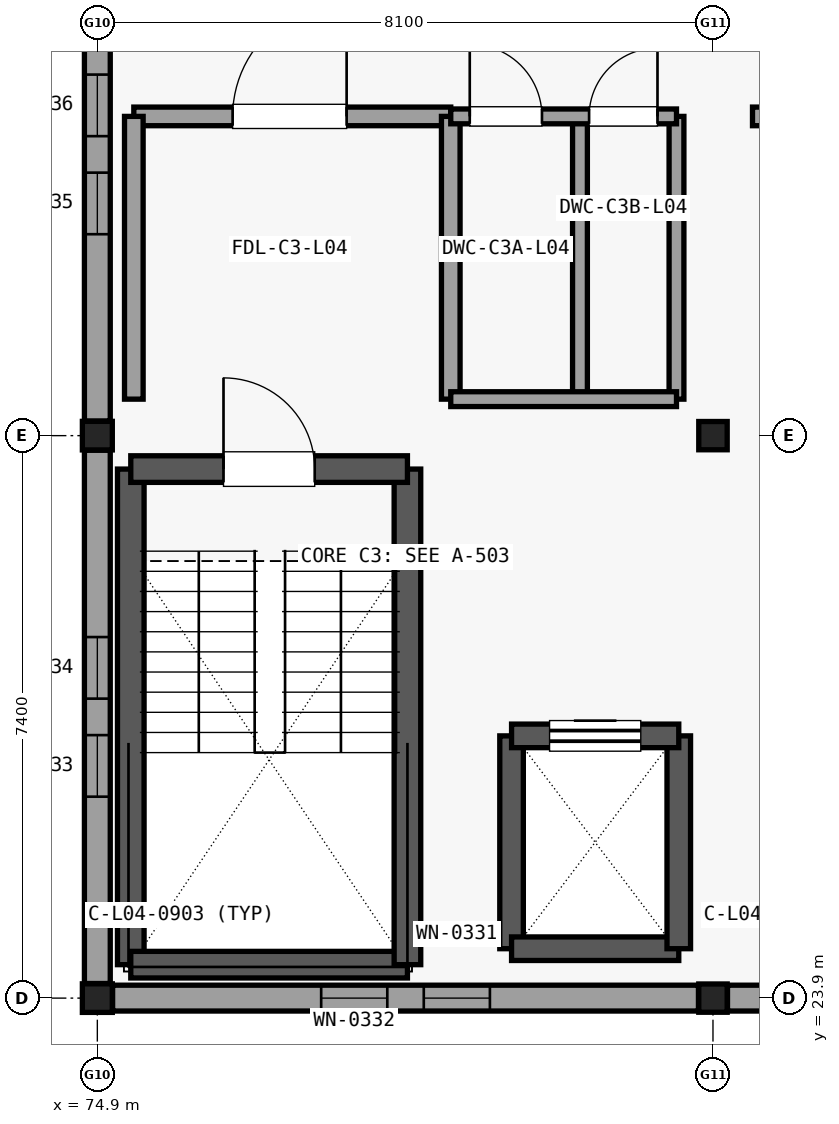
"""IFC4 building model, lengths in metres.
Left out: names, types, materials, properties, quantities, classifications, styles, units other than length and angle.
Written with IfcOpenShell. Run it as: python <this file> out.ifc"""

import sys

from ifc_helpers import new_model, si_unit, direction, frame, frame_2d, origin, origin_2d, place, context, subcontext, project, spatial, rectangle, i_section, extrude, element, fill, save


model = new_model("IFC4")
c1 = context("Model", 3, precision=1e-05, world=origin(), true_north=direction((0.0, 1.0)))
c2 = subcontext(c1, "Body", "Model", "MODEL_VIEW")
j1 = project(units=[si_unit("LENGTHUNIT", "METRE"), si_unit("PLANEANGLEUNIT", "RADIAN")], contexts=[c1])
p1 = place(None, origin())
s1 = spatial("IfcSite", under=j1, at=p1, CompositionType="ELEMENT")
p2 = place(p1, origin())
s2 = spatial("IfcBuilding", under=s1, at=p2, CompositionType="ELEMENT")
p3 = place(p2, frame((0.0, 0.0, 17.4)))
s3 = spatial("IfcBuildingStorey", under=s2, at=p3, CompositionType="ELEMENT", Elevation=17.4)
for number, where, z_axis, x_axis in (
    (1, (74.9, 23.9, 0.0), (0.0, 0.0, 1.0), (1.0, 0.0, 0.0)),
    (2, (74.9, 31.3, 0.0), (0.0, 0.0, 1.0), (1.0, 0.0, 0.0)),
):
    element("IfcColumn", number, at=place(p3, frame(where, z_axis=z_axis, x_axis=x_axis)), inside=s3, PredefinedType="COLUMN", context=c2, shape_type="SweptSolid", body=[
        extrude(i_section(OverallWidth=0.394, OverallDepth=0.376, WebThickness=0.017, FlangeThickness=0.028, at=origin_2d()), origin(), (0.0, 0.0, 1.0), 3.38),
    ])
for number, where, z_axis, x_axis in (
    (3, (83.0, 23.9, 0.0), (0.0, 0.0, 1.0), (1.0, 0.0, 0.0)),
    (4, (83.0, 31.3, 0.0), (0.0, 0.0, 1.0), (1.0, 0.0, 0.0)),
):
    element("IfcColumn", number, at=place(p3, frame(where, z_axis=z_axis, x_axis=x_axis)), inside=s3, PredefinedType="COLUMN", context=c2, shape_type="SweptSolid", body=[
        extrude(i_section(OverallWidth=0.374, OverallDepth=0.372, WebThickness=0.016, FlangeThickness=0.026, at=origin_2d()), origin(), (0.0, 0.0, 1.0), 3.38),
    ])
p4 = place(p3, frame((82.809, 23.9, 0.0), z_axis=(0.0, 0.0, 1.0), x_axis=(-1.0, 0.0, 0.0)))
e5 = element("IfcWall", 5, at=p4, inside=s3, PredefinedType="SOLIDWALL", context=c2, shape_type="SweptSolid", body=[
    extrude(rectangle(XDim=7.708, YDim=0.34, at=frame_2d((3.854, 0.0))), origin(), (0.0, 0.0, 1.0), 2.908),
])
p5 = place(p4, frame((2.744, 0.0, 0.6)))
e6 = element("IfcOpeningElement", 6, at=p5, cuts=e5, PredefinedType="OPENING", context=c2, shape_type="SweptSolid", body=[
    extrude(rectangle(XDim=0.87, YDim=1.82, at=frame_2d((0.435, 0.91))), frame((0.0, 0.18, 0.0), z_axis=(0.0, -1.0, 0.0), x_axis=(1.0, 0.0, 0.0)), (0.0, 0.0, 1.0), 0.36),
])
p6 = place(p4, frame((4.094, 0.0, 0.6)))
e7 = element("IfcOpeningElement", 7, at=p6, cuts=e5, PredefinedType="OPENING", context=c2, shape_type="SweptSolid", body=[
    extrude(rectangle(XDim=0.87, YDim=1.82, at=frame_2d((0.435, 0.91))), frame((0.0, 0.18, 0.0), z_axis=(0.0, -1.0, 0.0), x_axis=(1.0, 0.0, 0.0)), (0.0, 0.0, 1.0), 0.36),
])
p7 = place(p3, frame((74.9, 24.092, 0.0), z_axis=(0.0, 0.0, 1.0), x_axis=(0.0, 1.0, 0.0)))
e8 = element("IfcWall", 8, at=p7, inside=s3, PredefinedType="SOLIDWALL", context=c2, shape_type="SweptSolid", body=[
    extrude(rectangle(XDim=7.016, YDim=0.34, at=frame_2d((3.508, 0.0))), origin(), (0.0, 0.0, 1.0), 2.908),
])
p8 = place(p7, frame((2.458, 0.0, 0.6)))
e9 = element("IfcOpeningElement", 9, at=p8, cuts=e8, PredefinedType="OPENING", context=c2, shape_type="SweptSolid", body=[
    extrude(rectangle(XDim=0.81, YDim=1.84, at=frame_2d((0.405, 0.92))), frame((0.0, 0.18, 0.0), z_axis=(0.0, -1.0, 0.0), x_axis=(1.0, 0.0, 0.0)), (0.0, 0.0, 1.0), 0.36),
])
p9 = place(p7, frame((3.748, 0.0, 0.6)))
e10 = element("IfcOpeningElement", 10, at=p9, cuts=e8, PredefinedType="OPENING", context=c2, shape_type="SweptSolid", body=[
    extrude(rectangle(XDim=0.81, YDim=1.84, at=frame_2d((0.405, 0.92))), frame((0.0, 0.18, 0.0), z_axis=(0.0, -1.0, 0.0), x_axis=(1.0, 0.0, 0.0)), (0.0, 0.0, 1.0), 0.36),
])
p10 = place(p3, frame((74.9, 31.492, 0.0), z_axis=(0.0, 0.0, 1.0), x_axis=(0.0, 1.0, 0.0)))
e11 = element("IfcWall", 11, at=p10, inside=s3, PredefinedType="SOLIDWALL", context=c2, shape_type="SweptSolid", body=[
    extrude(rectangle(XDim=7.016, YDim=0.34, at=frame_2d((3.508, 0.0))), origin(), (0.0, 0.0, 1.0), 2.681),
])
p11 = place(p10, frame((2.458, 0.0, 0.6)))
e12 = element("IfcOpeningElement", 12, at=p11, cuts=e11, PredefinedType="OPENING", context=c2, shape_type="SweptSolid", body=[
    extrude(rectangle(XDim=0.81, YDim=1.84, at=frame_2d((0.405, 0.92))), frame((0.0, 0.18, 0.0), z_axis=(0.0, -1.0, 0.0), x_axis=(1.0, 0.0, 0.0)), (0.0, 0.0, 1.0), 0.36),
])
p12 = place(p10, frame((3.748, 0.0, 0.6)))
e13 = element("IfcOpeningElement", 13, at=p12, cuts=e11, PredefinedType="OPENING", context=c2, shape_type="SweptSolid", body=[
    extrude(rectangle(XDim=0.81, YDim=1.84, at=frame_2d((0.405, 0.92))), frame((0.0, 0.18, 0.0), z_axis=(0.0, -1.0, 0.0), x_axis=(1.0, 0.0, 0.0)), (0.0, 0.0, 1.0), 0.36),
])
p13 = place(p3, frame((90.909, 23.9, 0.0), z_axis=(0.0, 0.0, 1.0), x_axis=(-1.0, 0.0, 0.0)))
e14 = element("IfcWall", 14, at=p13, inside=s3, PredefinedType="SOLIDWALL", context=c2, shape_type="SweptSolid", body=[
    extrude(rectangle(XDim=7.718, YDim=0.34, at=frame_2d((3.859, 0.0))), origin(), (0.0, 0.0, 1.0), 2.908),
])
p14 = place(p13, frame((2.749, 0.0, 0.6)))
e15 = element("IfcOpeningElement", 15, at=p14, cuts=e14, PredefinedType="OPENING", context=c2, shape_type="SweptSolid", body=[
    extrude(rectangle(XDim=0.87, YDim=1.82, at=frame_2d((0.435, 0.91))), frame((0.0, 0.18, 0.0), z_axis=(0.0, -1.0, 0.0), x_axis=(1.0, 0.0, 0.0)), (0.0, 0.0, 1.0), 0.36),
])
p15 = place(p13, frame((4.099, 0.0, 0.6)))
e16 = element("IfcOpeningElement", 16, at=p15, cuts=e14, PredefinedType="OPENING", context=c2, shape_type="SweptSolid", body=[
    extrude(rectangle(XDim=0.87, YDim=1.82, at=frame_2d((0.435, 0.91))), frame((0.0, 0.18, 0.0), z_axis=(0.0, -1.0, 0.0), x_axis=(1.0, 0.0, 0.0)), (0.0, 0.0, 1.0), 0.36),
])
p16 = place(p3, frame((75.34, 24.34, 0.0), z_axis=(0.0, 0.0, 1.0), x_axis=(0.0, 1.0, 0.0)))
e17 = element("IfcWall", 17, at=p16, inside=s3, PredefinedType="SHEAR", context=c2, shape_type="SweptSolid", body=[
    extrude(rectangle(XDim=6.52, YDim=0.35, at=frame_2d((3.26, 0.0))), origin(), (0.0, 0.0, 1.0), 3.375),
])
p17 = place(p3, frame((75.34, 24.34, 0.0), z_axis=(0.0, 0.0, 1.0), x_axis=(1.0, 0.0, 0.0)))
e18 = element("IfcWall", 18, at=p17, inside=s3, PredefinedType="SHEAR", context=c2, shape_type="SweptSolid", body=[
    extrude(rectangle(XDim=3.64, YDim=0.35, at=frame_2d((1.82, 0.0))), origin(), (0.0, 0.0, 1.0), 3.375),
])
p18 = place(p3, frame((78.98, 24.34, 0.0), z_axis=(0.0, 0.0, 1.0), x_axis=(0.0, 1.0, 0.0)))
e19 = element("IfcWall", 19, at=p18, inside=s3, PredefinedType="SHEAR", context=c2, shape_type="SweptSolid", body=[
    extrude(rectangle(XDim=6.52, YDim=0.35, at=frame_2d((3.26, 0.0))), origin(), (0.0, 0.0, 1.0), 3.375),
])
p19 = place(p3, frame((75.34, 30.86, 0.0), z_axis=(0.0, 0.0, 1.0), x_axis=(1.0, 0.0, 0.0)))
e20 = element("IfcWall", 20, at=p19, inside=s3, PredefinedType="SHEAR", context=c2, shape_type="SweptSolid", body=[
    extrude(rectangle(XDim=3.64, YDim=0.35, at=frame_2d((1.82, 0.0))), origin(), (0.0, 0.0, 1.0), 3.375),
])
p20 = place(p19, frame((1.22, 0.0, 0.0)))
e21 = element("IfcOpeningElement", 21, at=p20, cuts=e20, PredefinedType="OPENING", context=c2, shape_type="SweptSolid", body=[
    extrude(rectangle(XDim=1.2, YDim=2.15, at=frame_2d((0.6, 1.075))), frame((0.0, 0.185, 0.0), z_axis=(0.0, -1.0, 0.0), x_axis=(1.0, 0.0, 0.0)), (0.0, 0.0, 1.0), 0.37),
])
p21 = place(p3, frame((80.35, 24.55, 0.0), z_axis=(0.0, 0.0, 1.0), x_axis=(0.0, 1.0, 0.0)))
e22 = element("IfcWall", 22, at=p21, inside=s3, PredefinedType="SHEAR", context=c2, shape_type="SweptSolid", body=[
    extrude(rectangle(XDim=2.8, YDim=0.31, at=frame_2d((1.4, 0.0))), origin(), (0.0, 0.0, 1.0), 3.375),
])
p22 = place(p3, frame((80.35, 24.55, 0.0), z_axis=(0.0, 0.0, 1.0), x_axis=(1.0, 0.0, 0.0)))
e23 = element("IfcWall", 23, at=p22, inside=s3, PredefinedType="SHEAR", context=c2, shape_type="SweptSolid", body=[
    extrude(rectangle(XDim=2.2, YDim=0.31, at=frame_2d((1.1, 0.0))), origin(), (0.0, 0.0, 1.0), 3.375),
])
p23 = place(p3, frame((82.55, 24.55, 0.0), z_axis=(0.0, 0.0, 1.0), x_axis=(0.0, 1.0, 0.0)))
e24 = element("IfcWall", 24, at=p23, inside=s3, PredefinedType="SHEAR", context=c2, shape_type="SweptSolid", body=[
    extrude(rectangle(XDim=2.8, YDim=0.31, at=frame_2d((1.4, 0.0))), origin(), (0.0, 0.0, 1.0), 3.375),
])
p24 = place(p3, frame((80.35, 27.35, 0.0), z_axis=(0.0, 0.0, 1.0), x_axis=(1.0, 0.0, 0.0)))
e25 = element("IfcWall", 25, at=p24, inside=s3, PredefinedType="SHEAR", context=c2, shape_type="SweptSolid", body=[
    extrude(rectangle(XDim=2.2, YDim=0.31, at=frame_2d((1.1, 0.0))), origin(), (0.0, 0.0, 1.0), 3.375),
])
p25 = place(p24, frame((0.5, 0.0, 0.0)))
e26 = element("IfcOpeningElement", 26, at=p25, cuts=e25, PredefinedType="OPENING", context=c2, shape_type="SweptSolid", body=[
    extrude(rectangle(XDim=1.2, YDim=2.15, at=frame_2d((0.6, 1.075))), frame((0.0, 0.165, 0.0), z_axis=(0.0, -1.0, 0.0), x_axis=(1.0, 0.0, 0.0)), (0.0, 0.0, 1.0), 0.33),
])
p26 = place(p3, frame((75.38, 35.5, 0.0), z_axis=(0.0, 0.0, 1.0), x_axis=(1.0, 0.0, 0.0)))
e27 = element("IfcWall", 27, at=p26, inside=s3, PredefinedType="PARTITIONING", context=c2, shape_type="SweptSolid", body=[
    extrude(rectangle(XDim=4.17, YDim=0.245, at=frame_2d((2.085, 0.0))), origin(), (0.0, 0.0, 1.0), 2.913),
])
p27 = place(p26, frame((1.3, 0.0, 0.0)))
e28 = element("IfcOpeningElement", 28, at=p27, cuts=e27, PredefinedType="OPENING", context=c2, shape_type="SweptSolid", body=[
    extrude(rectangle(XDim=1.5, YDim=2.15, at=frame_2d((0.75, 1.075))), frame((0.0, 0.133, 0.0), z_axis=(0.0, -1.0, 0.0), x_axis=(1.0, 0.0, 0.0)), (0.0, 0.0, 1.0), 0.265),
])
for number, where, z_axis, x_axis in (
    (29, (75.38, 31.78, 0.0), (0.0, 0.0, 1.0), (0.0, 1.0, 0.0)),
    (30, (79.55, 31.78, 0.0), (0.0, 0.0, 1.0), (0.0, 1.0, 0.0)),
):
    element("IfcWall", number, at=place(p3, frame(where, z_axis=z_axis, x_axis=x_axis)), inside=s3, PredefinedType="PARTITIONING", context=c2, shape_type="SweptSolid", body=[
        extrude(rectangle(XDim=3.72, YDim=0.245, at=frame_2d((1.86, 0.0))), origin(), (0.0, 0.0, 1.0), 2.913),
    ])
for number, where, z_axis, x_axis in (
    (31, (81.25, 31.78, 0.0), (0.0, 0.0, 1.0), (0.0, 1.0, 0.0)),
    (32, (82.52, 31.78, 0.0), (0.0, 0.0, 1.0), (0.0, 1.0, 0.0)),
):
    element("IfcWall", number, at=place(p3, frame(where, z_axis=z_axis, x_axis=x_axis)), inside=s3, PredefinedType="PARTITIONING", context=c2, shape_type="SweptSolid", body=[
        extrude(rectangle(XDim=3.72, YDim=0.195, at=frame_2d((1.86, 0.0))), origin(), (0.0, 0.0, 1.0), 2.913),
    ])
p28 = place(p3, frame((79.55, 31.78, 0.0), z_axis=(0.0, 0.0, 1.0), x_axis=(1.0, 0.0, 0.0)))
e33 = element("IfcWall", 33, at=p28, inside=s3, PredefinedType="PARTITIONING", context=c2, shape_type="SweptSolid", body=[
    extrude(rectangle(XDim=2.97, YDim=0.195, at=frame_2d((1.485, 0.0))), origin(), (0.0, 0.0, 1.0), 2.913),
])
p29 = place(p3, frame((79.55, 35.5, 0.0), z_axis=(0.0, 0.0, 1.0), x_axis=(1.0, 0.0, 0.0)))
e34 = element("IfcWall", 34, at=p29, inside=s3, PredefinedType="PARTITIONING", context=c2, shape_type="SweptSolid", body=[
    extrude(rectangle(XDim=2.97, YDim=0.195, at=frame_2d((1.485, 0.0))), origin(), (0.0, 0.0, 1.0), 3.365),
])
p30 = place(p29, frame((0.25, 0.0, 0.0)))
e35 = element("IfcOpeningElement", 35, at=p30, cuts=e34, PredefinedType="OPENING", context=c2, shape_type="SweptSolid", body=[
    extrude(rectangle(XDim=0.95, YDim=2.1, at=frame_2d((0.475, 1.05))), frame((0.0, 0.107, 0.0), z_axis=(0.0, -1.0, 0.0), x_axis=(1.0, 0.0, 0.0)), (0.0, 0.0, 1.0), 0.215),
])
p31 = place(p29, frame((1.82, 0.0, 0.0)))
e36 = element("IfcOpeningElement", 36, at=p31, cuts=e34, PredefinedType="OPENING", context=c2, shape_type="SweptSolid", body=[
    extrude(rectangle(XDim=0.9, YDim=2.1, at=frame_2d((0.45, 1.05))), frame((0.0, 0.107, 0.0), z_axis=(0.0, -1.0, 0.0), x_axis=(1.0, 0.0, 0.0)), (0.0, 0.0, 1.0), 0.215),
])
p32 = place(p3, frame((83.52, 35.5, 0.0), z_axis=(0.0, 0.0, 1.0), x_axis=(1.0, 0.0, 0.0)))
e37 = element("IfcWall", 37, at=p32, inside=s3, PredefinedType="PARTITIONING", context=c2, shape_type="SweptSolid", body=[
    extrude(rectangle(XDim=7.06, YDim=0.245, at=frame_2d((3.53, 0.0))), origin(), (0.0, 0.0, 1.0), 3.365),
])
p33 = place(p32, frame((2.43, 0.0, 0.0)))
e38 = element("IfcOpeningElement", 38, at=p33, cuts=e37, PredefinedType="OPENING", context=c2, shape_type="SweptSolid", body=[
    extrude(rectangle(XDim=2.2, YDim=2.65, at=frame_2d((1.1, 1.325))), frame((0.0, 0.133, 0.0), z_axis=(0.0, -1.0, 0.0), x_axis=(1.0, 0.0, 0.0)), (0.0, 0.0, 1.0), 0.265),
])
p34 = place(p5, origin())
e39 = element("IfcWindow", 39, at=p34, inside=s3, PartitioningType="SINGLE_PANEL", PredefinedType="WINDOW", context=c2, shape_type="SweptSolid", body=[
    extrude(rectangle(XDim=0.87, YDim=1.82, at=frame_2d((0.435, 0.91))), frame((0.0, 0.03, 0.0), z_axis=(0.0, -1.0, 0.0), x_axis=(1.0, 0.0, 0.0)), (0.0, 0.0, 1.0), 0.06),
])
fill(e6, e39)
p35 = place(p6, origin())
e40 = element("IfcWindow", 40, at=p35, inside=s3, PartitioningType="SINGLE_PANEL", PredefinedType="WINDOW", context=c2, shape_type="SweptSolid", body=[
    extrude(rectangle(XDim=0.87, YDim=1.82, at=frame_2d((0.435, 0.91))), frame((0.0, 0.03, 0.0), z_axis=(0.0, -1.0, 0.0), x_axis=(1.0, 0.0, 0.0)), (0.0, 0.0, 1.0), 0.06),
])
fill(e7, e40)
p36 = place(p8, origin())
e41 = element("IfcWindow", 41, at=p36, inside=s3, PartitioningType="SINGLE_PANEL", PredefinedType="WINDOW", context=c2, shape_type="SweptSolid", body=[
    extrude(rectangle(XDim=0.81, YDim=1.84, at=frame_2d((0.405, 0.92))), frame((0.0, 0.03, 0.0), z_axis=(0.0, -1.0, 0.0), x_axis=(1.0, 0.0, 0.0)), (0.0, 0.0, 1.0), 0.06),
])
fill(e9, e41)
p37 = place(p9, origin())
e42 = element("IfcWindow", 42, at=p37, inside=s3, PartitioningType="SINGLE_PANEL", PredefinedType="WINDOW", context=c2, shape_type="SweptSolid", body=[
    extrude(rectangle(XDim=0.81, YDim=1.84, at=frame_2d((0.405, 0.92))), frame((0.0, 0.03, 0.0), z_axis=(0.0, -1.0, 0.0), x_axis=(1.0, 0.0, 0.0)), (0.0, 0.0, 1.0), 0.06),
])
fill(e10, e42)
p38 = place(p11, origin())
e43 = element("IfcWindow", 43, at=p38, inside=s3, PartitioningType="SINGLE_PANEL", PredefinedType="WINDOW", context=c2, shape_type="SweptSolid", body=[
    extrude(rectangle(XDim=0.81, YDim=1.84, at=frame_2d((0.405, 0.92))), frame((0.0, 0.03, 0.0), z_axis=(0.0, -1.0, 0.0), x_axis=(1.0, 0.0, 0.0)), (0.0, 0.0, 1.0), 0.06),
])
fill(e12, e43)
p39 = place(p12, origin())
e44 = element("IfcWindow", 44, at=p39, inside=s3, PartitioningType="SINGLE_PANEL", PredefinedType="WINDOW", context=c2, shape_type="SweptSolid", body=[
    extrude(rectangle(XDim=0.81, YDim=1.84, at=frame_2d((0.405, 0.92))), frame((0.0, 0.03, 0.0), z_axis=(0.0, -1.0, 0.0), x_axis=(1.0, 0.0, 0.0)), (0.0, 0.0, 1.0), 0.06),
])
fill(e13, e44)
p40 = place(p20, origin())
e45 = element("IfcDoor", 45, at=p40, inside=s3, OperationType="SINGLE_SWING_LEFT", PredefinedType="DOOR", context=c2, shape_type="SweptSolid", body=[
    extrude(rectangle(XDim=1.2, YDim=2.15, at=frame_2d((0.6, 1.075))), frame((0.0, 0.025, 0.0), z_axis=(0.0, -1.0, 0.0), x_axis=(1.0, 0.0, 0.0)), (0.0, 0.0, 1.0), 0.05),
])
fill(e21, e45)
p41 = place(p25, origin())
e46 = element("IfcDoor", 46, at=p41, inside=s3, OperationType="SLIDING_TO_RIGHT", PredefinedType="DOOR", context=c2, shape_type="SweptSolid", body=[
    extrude(rectangle(XDim=1.2, YDim=2.15, at=frame_2d((0.6, 1.075))), frame((0.0, 0.025, 0.0), z_axis=(0.0, -1.0, 0.0), x_axis=(1.0, 0.0, 0.0)), (0.0, 0.0, 1.0), 0.05),
])
fill(e26, e46)
p42 = place(p27, origin())
e47 = element("IfcDoor", 47, at=p42, inside=s3, OperationType="SINGLE_SWING_RIGHT", PredefinedType="DOOR", context=c2, shape_type="SweptSolid", body=[
    extrude(rectangle(XDim=1.5, YDim=2.15, at=frame_2d((0.75, 1.075))), frame((0.0, 0.025, 0.0), z_axis=(0.0, -1.0, 0.0), x_axis=(1.0, 0.0, 0.0)), (0.0, 0.0, 1.0), 0.05),
])
fill(e28, e47)
p43 = place(p30, origin())
e48 = element("IfcDoor", 48, at=p43, inside=s3, OperationType="SINGLE_SWING_LEFT", PredefinedType="DOOR", context=c2, shape_type="SweptSolid", body=[
    extrude(rectangle(XDim=0.95, YDim=2.1, at=frame_2d((0.475, 1.05))), frame((0.0, 0.025, 0.0), z_axis=(0.0, -1.0, 0.0), x_axis=(1.0, 0.0, 0.0)), (0.0, 0.0, 1.0), 0.05),
])
fill(e35, e48)
p44 = place(p31, origin())
e49 = element("IfcDoor", 49, at=p44, inside=s3, OperationType="SINGLE_SWING_RIGHT", PredefinedType="DOOR", context=c2, shape_type="SweptSolid", body=[
    extrude(rectangle(XDim=0.9, YDim=2.1, at=frame_2d((0.45, 1.05))), frame((0.0, 0.025, 0.0), z_axis=(0.0, -1.0, 0.0), x_axis=(1.0, 0.0, 0.0)), (0.0, 0.0, 1.0), 0.05),
])
fill(e36, e49)
save(model, sys.argv[1])
